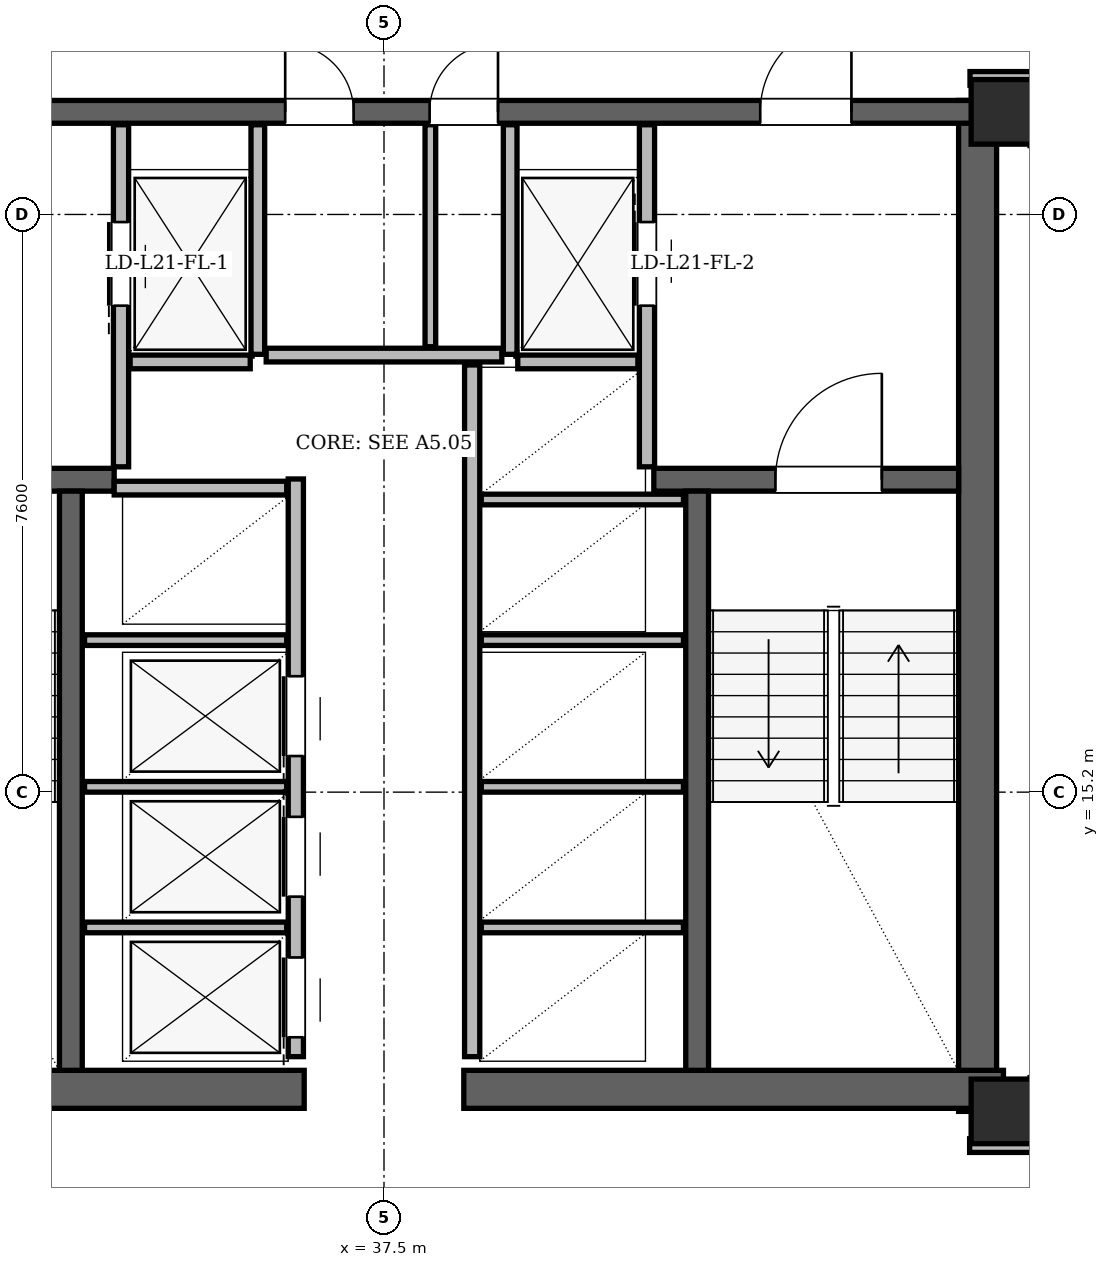
"""IFC4 building model, lengths in metres.
Left out: names, types, materials, properties, quantities, classifications, styles, units other than length and angle.
Written with IfcOpenShell. Run it as: python <this file> out.ifc"""

import sys

from ifc_helpers import new_model, si_unit, direction, frame, frame_2d, origin, origin_2d, place, context, subcontext, project, spatial, rectangle, hollow_rectangle, extrude, element, fill, save


model = new_model("IFC4")
c1 = context("Model", 3, precision=1e-05, world=origin(), true_north=direction((0.0, 1.0)))
c2 = subcontext(c1, "Body", "Model", "MODEL_VIEW")
j1 = project(units=[si_unit("LENGTHUNIT", "METRE"), si_unit("PLANEANGLEUNIT", "RADIAN")], contexts=[c1])
p1 = place(None, origin())
s1 = spatial("IfcSite", under=j1, at=p1, CompositionType="ELEMENT")
p2 = place(p1, origin())
s2 = spatial("IfcBuilding", under=s1, at=p2, CompositionType="ELEMENT")
p3 = place(p2, frame((0.0, 0.0, 82.5)))
s3 = spatial("IfcBuildingStorey", under=s2, at=p3, CompositionType="ELEMENT", Elevation=82.5)
for number, where, z_axis, x_axis in (
    (1, (45.65, 11.0, 0.0), (0.0, 0.0, 1.0), (1.0, 0.0, 0.0)),
    (2, (45.65, 24.15, 0.0), (0.0, 0.0, 1.0), (1.0, 0.0, 0.0)),
):
    element("IfcColumn", number, at=place(p3, frame(where, z_axis=z_axis, x_axis=x_axis)), inside=s3, PredefinedType="COLUMN", context=c2, shape_type="SweptSolid", body=[
        extrude(hollow_rectangle(XDim=0.85, YDim=0.85, WallThickness=0.07, at=origin_2d()), origin(), (0.0, 0.0, 1.0), 3.6),
    ])
p4 = place(p3, frame((45.31, 11.0, 0.0), z_axis=(0.0, 0.0, 1.0), x_axis=(0.0, 1.0, 0.0)))
e3 = element("IfcWall", 3, at=p4, inside=s3, PredefinedType="SHEAR", context=c2, shape_type="SweptSolid", body=[
    extrude(rectangle(XDim=13.3, YDim=0.5, at=frame_2d((6.65, 0.0))), origin(), (0.0, 0.0, 1.0), 3.36),
])
for number, where, z_axis, x_axis in (
    (4, (29.35, 11.29, 0.0), (0.0, 0.0, 1.0), (1.0, 0.0, 0.0)),
    (5, (38.55, 11.29, 0.0), (0.0, 0.0, 1.0), (1.0, 0.0, 0.0)),
):
    element("IfcWall", number, at=place(p3, frame(where, z_axis=z_axis, x_axis=x_axis)), inside=s3, PredefinedType="SHEAR", context=c2, shape_type="SweptSolid", body=[
        extrude(rectangle(XDim=7.1, YDim=0.5, at=frame_2d((3.55, 0.0))), origin(), (0.0, 0.0, 1.0), 3.36),
    ])
p5 = place(p3, frame((29.65, 24.15, 0.0), z_axis=(0.0, 0.0, 1.0), x_axis=(1.0, 0.0, 0.0)))
e6 = element("IfcWall", 6, at=p5, inside=s3, PredefinedType="SHEAR", context=c2, shape_type="SweptSolid", body=[
    extrude(rectangle(XDim=15.7, YDim=0.3, at=frame_2d((7.85, 0.0))), origin(), (0.0, 0.0, 1.0), 3.36),
])
p6 = place(p5, frame((1.7, 0.0, 0.0)))
e7 = element("IfcOpeningElement", 7, at=p6, cuts=e6, PredefinedType="OPENING", context=c2, shape_type="SweptSolid", body=[
    extrude(rectangle(XDim=1.2, YDim=2.2, at=frame_2d((0.6, 1.1))), frame((0.0, 0.15, 0.0), z_axis=(0.0, -1.0, 0.0), x_axis=(1.0, 0.0, 0.0)), (0.0, 0.0, 1.0), 0.3),
])
p7 = place(p5, frame((12.8, 0.0, 0.0)))
e8 = element("IfcOpeningElement", 8, at=p7, cuts=e6, PredefinedType="OPENING", context=c2, shape_type="SweptSolid", body=[
    extrude(rectangle(XDim=1.2, YDim=2.2, at=frame_2d((0.6, 1.1))), frame((0.0, 0.15, 0.0), z_axis=(0.0, -1.0, 0.0), x_axis=(1.0, 0.0, 0.0)), (0.0, 0.0, 1.0), 0.3),
])
p8 = place(p5, frame((6.55, 0.0, 0.0)))
e9 = element("IfcOpeningElement", 9, at=p8, cuts=e6, PredefinedType="OPENING", context=c2, shape_type="SweptSolid", body=[
    extrude(rectangle(XDim=0.9, YDim=2.05, at=frame_2d((0.45, 1.025))), frame((0.0, 0.15, 0.0), z_axis=(0.0, -1.0, 0.0), x_axis=(1.0, 0.0, 0.0)), (0.0, 0.0, 1.0), 0.3),
])
p9 = place(p5, frame((8.45, 0.0, 0.0)))
e10 = element("IfcOpeningElement", 10, at=p9, cuts=e6, PredefinedType="OPENING", context=c2, shape_type="SweptSolid", body=[
    extrude(rectangle(XDim=0.9, YDim=2.05, at=frame_2d((0.45, 1.025))), frame((0.0, 0.15, 0.0), z_axis=(0.0, -1.0, 0.0), x_axis=(1.0, 0.0, 0.0)), (0.0, 0.0, 1.0), 0.3),
])
p10 = place(p3, frame((29.94, 19.31, 0.0), z_axis=(0.0, 0.0, 1.0), x_axis=(1.0, 0.0, 0.0)))
e11 = element("IfcWall", 11, at=p10, inside=s3, PredefinedType="SHEAR", context=c2, shape_type="SweptSolid", body=[
    extrude(rectangle(XDim=4.01, YDim=0.3, at=frame_2d((2.005, 0.0))), origin(), (0.0, 0.0, 1.0), 3.36),
])
p11 = place(p10, frame((1.01, 0.0, 0.0)))
e12 = element("IfcOpeningElement", 12, at=p11, cuts=e11, PredefinedType="OPENING", context=c2, shape_type="SweptSolid", body=[
    extrude(rectangle(XDim=1.4, YDim=2.2, at=frame_2d((0.7, 1.1))), frame((0.0, 0.15, 0.0), z_axis=(0.0, -1.0, 0.0), x_axis=(1.0, 0.0, 0.0)), (0.0, 0.0, 1.0), 0.3),
])
p12 = place(p3, frame((41.05, 19.31, 0.0), z_axis=(0.0, 0.0, 1.0), x_axis=(1.0, 0.0, 0.0)))
e13 = element("IfcWall", 13, at=p12, inside=s3, PredefinedType="SHEAR", context=c2, shape_type="SweptSolid", body=[
    extrude(rectangle(XDim=4.01, YDim=0.3, at=frame_2d((2.005, 0.0))), origin(), (0.0, 0.0, 1.0), 3.36),
])
p13 = place(p12, frame((1.6, 0.0, 0.0)))
e14 = element("IfcOpeningElement", 14, at=p13, cuts=e13, PredefinedType="OPENING", context=c2, shape_type="SweptSolid", body=[
    extrude(rectangle(XDim=1.4, YDim=2.2, at=frame_2d((0.7, 1.1))), frame((0.0, 0.15, 0.0), z_axis=(0.0, -1.0, 0.0), x_axis=(1.0, 0.0, 0.0)), (0.0, 0.0, 1.0), 0.3),
])
for number, where, z_axis, x_axis in (
    (15, (33.38, 11.54, 0.0), (0.0, 0.0, 1.0), (0.0, 1.0, 0.0)),
    (16, (41.62, 11.54, 0.0), (0.0, 0.0, 1.0), (0.0, 1.0, 0.0)),
):
    element("IfcWall", number, at=place(p3, frame(where, z_axis=z_axis, x_axis=x_axis)), inside=s3, PredefinedType="SHEAR", context=c2, shape_type="SweptSolid", body=[
        extrude(rectangle(XDim=7.62, YDim=0.3, at=frame_2d((3.81, 0.0))), origin(), (0.0, 0.0, 1.0), 3.36),
    ])
p14 = place(p3, frame((60.975, 13.961, 0.0), z_axis=(0.0, 0.0, 1.0), x_axis=(-0.499998999238, 0.866025981574, 0.0)))
e17 = element("IfcWall", 17, at=p14, inside=s3, PredefinedType="SOLIDWALL", context=c2, shape_type="SweptSolid", body=[
    extrude(rectangle(XDim=34.108, YDim=0.34, at=frame_2d((17.054, 0.0))), origin(), (0.0, 0.0, 1.0), 2.578),
])
p15 = place(p14, frame((6.369, 0.0, 0.0)))
e18 = element("IfcOpeningElement", 18, at=p15, cuts=e17, PredefinedType="OPENING", context=c2, shape_type="SweptSolid", body=[
    extrude(rectangle(XDim=1.5, YDim=2.2, at=frame_2d((0.75, 1.1))), frame((0.0, 0.17, 0.0), z_axis=(0.0, -1.0, 0.0), x_axis=(1.0, 0.0, 0.0)), (0.0, 0.0, 1.0), 0.34),
])
p16 = place(p14, frame((24.784, 0.0, 0.0)))
e19 = element("IfcOpeningElement", 19, at=p16, cuts=e17, PredefinedType="OPENING", context=c2, shape_type="SweptSolid", body=[
    extrude(rectangle(XDim=1.5, YDim=2.2, at=frame_2d((0.75, 1.1))), frame((0.0, 0.17, 0.0), z_axis=(0.0, -1.0, 0.0), x_axis=(1.0, 0.0, 0.0)), (0.0, 0.0, 1.0), 0.34),
])
p17 = place(p14, frame((1.56, 0.0, 0.85)))
e20 = element("IfcOpeningElement", 20, at=p17, cuts=e17, PredefinedType="OPENING", context=c2, shape_type="SweptSolid", body=[
    extrude(rectangle(XDim=1.2, YDim=1.48, at=frame_2d((0.6, 0.74))), frame((0.0, 0.17, 0.0), z_axis=(0.0, -1.0, 0.0), x_axis=(1.0, 0.0, 0.0)), (0.0, 0.0, 1.0), 0.34),
])
p18 = place(p14, frame((30.603, 0.0, 0.85)))
e21 = element("IfcOpeningElement", 21, at=p18, cuts=e17, PredefinedType="OPENING", context=c2, shape_type="SweptSolid", body=[
    extrude(rectangle(XDim=2.5, YDim=1.618, at=frame_2d((1.25, 0.809))), frame((0.0, 0.17, 0.0), z_axis=(0.0, -1.0, 0.0), x_axis=(1.0, 0.0, 0.0)), (0.0, 0.0, 1.0), 0.34),
])
p19 = place(p14, frame((20.212, 0.0, 0.85)))
e22 = element("IfcOpeningElement", 22, at=p19, cuts=e17, PredefinedType="OPENING", context=c2, shape_type="SweptSolid", body=[
    extrude(rectangle(XDim=2.4, YDim=1.618, at=frame_2d((1.2, 0.809))), frame((0.0, 0.17, 0.0), z_axis=(0.0, -1.0, 0.0), x_axis=(1.0, 0.0, 0.0)), (0.0, 0.0, 1.0), 0.34),
])
p20 = place(p14, frame((15.221, 0.0, 0.85)))
e23 = element("IfcOpeningElement", 23, at=p20, cuts=e17, PredefinedType="OPENING", context=c2, shape_type="SweptSolid", body=[
    extrude(rectangle(XDim=1.2, YDim=1.48, at=frame_2d((0.6, 0.74))), frame((0.0, 0.17, 0.0), z_axis=(0.0, -1.0, 0.0), x_axis=(1.0, 0.0, 0.0)), (0.0, 0.0, 1.0), 0.34),
])
p21 = place(p14, frame((17.561, 0.0, 0.85)))
e24 = element("IfcOpeningElement", 24, at=p21, cuts=e17, PredefinedType="OPENING", context=c2, shape_type="SweptSolid", body=[
    extrude(rectangle(XDim=1.4, YDim=1.6, at=frame_2d((0.7, 0.8))), frame((0.0, 0.17, 0.0), z_axis=(0.0, -1.0, 0.0), x_axis=(1.0, 0.0, 0.0)), (0.0, 0.0, 1.0), 0.34),
])
p22 = place(p3, frame((34.04, 19.48, 0.0), z_axis=(0.0, 0.0, 1.0), x_axis=(0.0, 1.0, 0.0)))
e25 = element("IfcWall", 25, at=p22, inside=s3, PredefinedType="PARTITIONING", context=c2, shape_type="SweptSolid", body=[
    extrude(rectangle(XDim=4.5, YDim=0.2, at=frame_2d((2.25, 0.0))), origin(), (0.0, 0.0, 1.0), 2.4),
])
p23 = place(p22, frame((2.12, 0.0, 0.0)))
e26 = element("IfcOpeningElement", 26, at=p23, cuts=e25, PredefinedType="OPENING", context=c2, shape_type="SweptSolid", body=[
    extrude(rectangle(XDim=1.1, YDim=2.2, at=frame_2d((0.55, 1.1))), frame((0.0, 0.1, 0.0), z_axis=(0.0, -1.0, 0.0), x_axis=(1.0, 0.0, 0.0)), (0.0, 0.0, 1.0), 0.2),
])
p24 = place(p3, frame((35.84, 20.96, 0.0), z_axis=(0.0, 0.0, 1.0), x_axis=(0.0, 1.0, 0.0)))
e27 = element("IfcWall", 27, at=p24, inside=s3, PredefinedType="PARTITIONING", context=c2, shape_type="SweptSolid", body=[
    extrude(rectangle(XDim=3.02, YDim=0.18, at=frame_2d((1.51, 0.0))), origin(), (0.0, 0.0, 1.0), 2.4),
])
p25 = place(p3, frame((34.16, 20.86, 0.0), z_axis=(0.0, 0.0, 1.0), x_axis=(1.0, 0.0, 0.0)))
e28 = element("IfcWall", 28, at=p25, inside=s3, PredefinedType="PARTITIONING", context=c2, shape_type="SweptSolid", body=[
    extrude(rectangle(XDim=1.58, YDim=0.18, at=frame_2d((0.79, 0.0))), origin(), (0.0, 0.0, 1.0), 3.36),
])
p26 = place(p3, frame((40.96, 19.48, 0.0), z_axis=(0.0, 0.0, 1.0), x_axis=(0.0, 1.0, 0.0)))
e29 = element("IfcWall", 29, at=p26, inside=s3, PredefinedType="PARTITIONING", context=c2, shape_type="SweptSolid", body=[
    extrude(rectangle(XDim=4.5, YDim=0.2, at=frame_2d((2.25, 0.0))), origin(), (0.0, 0.0, 1.0), 2.4),
])
p27 = place(p26, frame((2.12, 0.0, 0.0)))
e30 = element("IfcOpeningElement", 30, at=p27, cuts=e29, PredefinedType="OPENING", context=c2, shape_type="SweptSolid", body=[
    extrude(rectangle(XDim=1.1, YDim=2.2, at=frame_2d((0.55, 1.1))), frame((0.0, 0.1, 0.0), z_axis=(0.0, -1.0, 0.0), x_axis=(1.0, 0.0, 0.0)), (0.0, 0.0, 1.0), 0.2),
])
p28 = place(p3, frame((39.16, 20.96, 0.0), z_axis=(0.0, 0.0, 1.0), x_axis=(0.0, 1.0, 0.0)))
e31 = element("IfcWall", 31, at=p28, inside=s3, PredefinedType="PARTITIONING", context=c2, shape_type="SweptSolid", body=[
    extrude(rectangle(XDim=3.02, YDim=0.18, at=frame_2d((1.51, 0.0))), origin(), (0.0, 0.0, 1.0), 2.4),
])
p29 = place(p3, frame((39.26, 20.86, 0.0), z_axis=(0.0, 0.0, 1.0), x_axis=(1.0, 0.0, 0.0)))
e32 = element("IfcWall", 32, at=p29, inside=s3, PredefinedType="PARTITIONING", context=c2, shape_type="SweptSolid", body=[
    extrude(rectangle(XDim=1.58, YDim=0.18, at=frame_2d((0.79, 0.0))), origin(), (0.0, 0.0, 1.0), 3.36),
])
p30 = place(p3, frame((36.34, 11.72, 0.0), z_axis=(0.0, 0.0, 1.0), x_axis=(0.0, 1.0, 0.0)))
e33 = element("IfcWall", 33, at=p30, inside=s3, PredefinedType="PARTITIONING", context=c2, shape_type="SweptSolid", body=[
    extrude(rectangle(XDim=7.6, YDim=0.2, at=frame_2d((3.8, 0.0))), origin(), (0.0, 0.0, 1.0), 3.36),
])
p31 = place(p30, frame((0.255, 0.0, 0.0)))
e34 = element("IfcOpeningElement", 34, at=p31, cuts=e33, PredefinedType="OPENING", context=c2, shape_type="SweptSolid", body=[
    extrude(rectangle(XDim=1.05, YDim=2.15, at=frame_2d((0.525, 1.075))), frame((0.0, 0.1, 0.0), z_axis=(0.0, -1.0, 0.0), x_axis=(1.0, 0.0, 0.0)), (0.0, 0.0, 1.0), 0.2),
])
p32 = place(p30, frame((2.105, 0.0, 0.0)))
e35 = element("IfcOpeningElement", 35, at=p32, cuts=e33, PredefinedType="OPENING", context=c2, shape_type="SweptSolid", body=[
    extrude(rectangle(XDim=1.05, YDim=2.15, at=frame_2d((0.525, 1.075))), frame((0.0, 0.1, 0.0), z_axis=(0.0, -1.0, 0.0), x_axis=(1.0, 0.0, 0.0)), (0.0, 0.0, 1.0), 0.2),
])
p33 = place(p30, frame((3.955, 0.0, 0.0)))
e36 = element("IfcOpeningElement", 36, at=p33, cuts=e33, PredefinedType="OPENING", context=c2, shape_type="SweptSolid", body=[
    extrude(rectangle(XDim=1.05, YDim=2.15, at=frame_2d((0.525, 1.075))), frame((0.0, 0.1, 0.0), z_axis=(0.0, -1.0, 0.0), x_axis=(1.0, 0.0, 0.0)), (0.0, 0.0, 1.0), 0.2),
])
p34 = place(p3, frame((33.95, 19.2, 0.0), z_axis=(0.0, 0.0, 1.0), x_axis=(1.0, 0.0, 0.0)))
e37 = element("IfcWall", 37, at=p34, inside=s3, PredefinedType="PARTITIONING", context=c2, shape_type="SweptSolid", body=[
    extrude(rectangle(XDim=2.27, YDim=0.18, at=frame_2d((1.135, 0.0))), origin(), (0.0, 0.0, 1.0), 3.36),
])
for number, where, z_axis, x_axis in (
    (38, (33.56, 13.42, 0.0), (0.0, 0.0, 1.0), (1.0, 0.0, 0.0)),
    (39, (33.56, 15.27, 0.0), (0.0, 0.0, 1.0), (1.0, 0.0, 0.0)),
    (40, (33.56, 17.2, 0.0), (0.0, 0.0, 1.0), (1.0, 0.0, 0.0)),
):
    element("IfcWall", number, at=place(p3, frame(where, z_axis=z_axis, x_axis=x_axis)), inside=s3, PredefinedType="PARTITIONING", context=c2, shape_type="SweptSolid", body=[
        extrude(rectangle(XDim=2.66, YDim=0.14, at=frame_2d((1.33, 0.0))), origin(), (0.0, 0.0, 1.0), 3.36),
    ])
p35 = place(p3, frame((38.66, 11.72, 0.0), z_axis=(0.0, 0.0, 1.0), x_axis=(0.0, 1.0, 0.0)))
e41 = element("IfcWall", 41, at=p35, inside=s3, PredefinedType="PARTITIONING", context=c2, shape_type="SweptSolid", body=[
    extrude(rectangle(XDim=9.1, YDim=0.2, at=frame_2d((4.55, 0.0))), origin(), (0.0, 0.0, 1.0), 3.36),
])
for number, where, z_axis, x_axis in (
    (42, (38.78, 13.42, 0.0), (0.0, 0.0, 1.0), (1.0, 0.0, 0.0)),
    (43, (38.78, 15.27, 0.0), (0.0, 0.0, 1.0), (1.0, 0.0, 0.0)),
    (44, (38.78, 17.2, 0.0), (0.0, 0.0, 1.0), (1.0, 0.0, 0.0)),
    (45, (38.78, 19.05, 0.0), (0.0, 0.0, 1.0), (1.0, 0.0, 0.0)),
):
    element("IfcWall", number, at=place(p3, frame(where, z_axis=z_axis, x_axis=x_axis)), inside=s3, PredefinedType="PARTITIONING", context=c2, shape_type="SweptSolid", body=[
        extrude(rectangle(XDim=2.66, YDim=0.14, at=frame_2d((1.33, 0.0))), origin(), (0.0, 0.0, 1.0), 3.36),
    ])
p36 = place(p3, frame((35.95, 20.95, 0.0), z_axis=(0.0, 0.0, 1.0), x_axis=(1.0, 0.0, 0.0)))
e46 = element("IfcWall", 46, at=p36, inside=s3, PredefinedType="PARTITIONING", context=c2, shape_type="SweptSolid", body=[
    extrude(rectangle(XDim=3.1, YDim=0.18, at=frame_2d((1.55, 0.0))), origin(), (0.0, 0.0, 1.0), 3.36),
])
p37 = place(p3, frame((38.11, 21.06, 0.0), z_axis=(0.0, 0.0, 1.0), x_axis=(0.0, 1.0, 0.0)))
e47 = element("IfcWall", 47, at=p37, inside=s3, PredefinedType="PARTITIONING", context=c2, shape_type="SweptSolid", body=[
    extrude(rectangle(XDim=2.92, YDim=0.14, at=frame_2d((1.46, 0.0))), origin(), (0.0, 0.0, 1.0), 2.4),
])
p38 = place(p3, frame((45.205, 10.55, 0.0), z_axis=(0.0, 0.0, 1.0), x_axis=(1.0, 0.0, 0.0)))
e48 = element("IfcWall", 48, at=p38, inside=s3, PredefinedType="PARTITIONING", context=c2, shape_type="SweptSolid", body=[
    extrude(rectangle(XDim=0.89, YDim=0.18, at=frame_2d((0.445, 0.0))), origin(), (0.0, 0.0, 1.0), 3.36),
])
p39 = place(p3, frame((45.21, 24.59, 0.0), z_axis=(0.0, 0.0, 1.0), x_axis=(1.0, 0.0, 0.0)))
e49 = element("IfcWall", 49, at=p39, inside=s3, PredefinedType="PARTITIONING", context=c2, shape_type="SweptSolid", body=[
    extrude(rectangle(XDim=0.88, YDim=0.18, at=frame_2d((0.44, 0.0))), origin(), (0.0, 0.0, 1.0), 2.814),
])
p40 = place(p23, origin())
e50 = element("IfcDoor", 50, at=p40, inside=s3, OperationType="SLIDING_TO_LEFT", PredefinedType="DOOR", context=c2, shape_type="SweptSolid", body=[
    extrude(rectangle(XDim=1.1, YDim=2.2, at=frame_2d((0.55, 1.1))), frame((0.0, 0.025, 0.0), z_axis=(0.0, -1.0, 0.0), x_axis=(1.0, 0.0, 0.0)), (0.0, 0.0, 1.0), 0.05),
])
fill(e26, e50)
p41 = place(p27, origin())
e51 = element("IfcDoor", 51, at=p41, inside=s3, OperationType="SLIDING_TO_RIGHT", PredefinedType="DOOR", context=c2, shape_type="SweptSolid", body=[
    extrude(rectangle(XDim=1.1, YDim=2.2, at=frame_2d((0.55, 1.1))), frame((0.0, 0.025, 0.0), z_axis=(0.0, -1.0, 0.0), x_axis=(1.0, 0.0, 0.0)), (0.0, 0.0, 1.0), 0.05),
])
fill(e30, e51)
p42 = place(p31, origin())
e52 = element("IfcDoor", 52, at=p42, inside=s3, OperationType="SLIDING_TO_LEFT", PredefinedType="DOOR", context=c2, shape_type="SweptSolid", body=[
    extrude(rectangle(XDim=1.05, YDim=2.15, at=frame_2d((0.525, 1.075))), frame((0.0, 0.025, 0.0), z_axis=(0.0, -1.0, 0.0), x_axis=(1.0, 0.0, 0.0)), (0.0, 0.0, 1.0), 0.05),
])
fill(e34, e52)
p43 = place(p32, origin())
e53 = element("IfcDoor", 53, at=p43, inside=s3, OperationType="SLIDING_TO_RIGHT", PredefinedType="DOOR", context=c2, shape_type="SweptSolid", body=[
    extrude(rectangle(XDim=1.05, YDim=2.15, at=frame_2d((0.525, 1.075))), frame((0.0, 0.025, 0.0), z_axis=(0.0, -1.0, 0.0), x_axis=(1.0, 0.0, 0.0)), (0.0, 0.0, 1.0), 0.05),
])
fill(e35, e53)
p44 = place(p33, origin())
e54 = element("IfcDoor", 54, at=p44, inside=s3, OperationType="SLIDING_TO_LEFT", PredefinedType="DOOR", context=c2, shape_type="SweptSolid", body=[
    extrude(rectangle(XDim=1.05, YDim=2.15, at=frame_2d((0.525, 1.075))), frame((0.0, 0.025, 0.0), z_axis=(0.0, -1.0, 0.0), x_axis=(1.0, 0.0, 0.0)), (0.0, 0.0, 1.0), 0.05),
])
fill(e36, e54)
p45 = place(p13, origin())
e55 = element("IfcDoor", 55, at=p45, inside=s3, OperationType="SINGLE_SWING_RIGHT", PredefinedType="DOOR", context=c2, shape_type="SweptSolid", body=[
    extrude(rectangle(XDim=1.4, YDim=2.2, at=frame_2d((0.7, 1.1))), frame((0.0, 0.025, 0.0), z_axis=(0.0, -1.0, 0.0), x_axis=(1.0, 0.0, 0.0)), (0.0, 0.0, 1.0), 0.05),
])
fill(e14, e55)
p46 = place(p7, origin())
e56 = element("IfcDoor", 56, at=p46, inside=s3, OperationType="SINGLE_SWING_RIGHT", PredefinedType="DOOR", context=c2, shape_type="SweptSolid", body=[
    extrude(rectangle(XDim=1.2, YDim=2.2, at=frame_2d((0.6, 1.1))), frame((0.0, 0.025, 0.0), z_axis=(0.0, -1.0, 0.0), x_axis=(1.0, 0.0, 0.0)), (0.0, 0.0, 1.0), 0.05),
])
fill(e8, e56)
p47 = place(p8, origin())
e57 = element("IfcDoor", 57, at=p47, inside=s3, OperationType="SINGLE_SWING_LEFT", PredefinedType="DOOR", context=c2, shape_type="SweptSolid", body=[
    extrude(rectangle(XDim=0.9, YDim=2.05, at=frame_2d((0.45, 1.025))), frame((0.0, 0.025, 0.0), z_axis=(0.0, -1.0, 0.0), x_axis=(1.0, 0.0, 0.0)), (0.0, 0.0, 1.0), 0.05),
])
fill(e9, e57)
p48 = place(p9, origin())
e58 = element("IfcDoor", 58, at=p48, inside=s3, OperationType="SINGLE_SWING_RIGHT", PredefinedType="DOOR", context=c2, shape_type="SweptSolid", body=[
    extrude(rectangle(XDim=0.9, YDim=2.05, at=frame_2d((0.45, 1.025))), frame((0.0, 0.025, 0.0), z_axis=(0.0, -1.0, 0.0), x_axis=(1.0, 0.0, 0.0)), (0.0, 0.0, 1.0), 0.05),
])
fill(e10, e58)
save(model, sys.argv[1])
